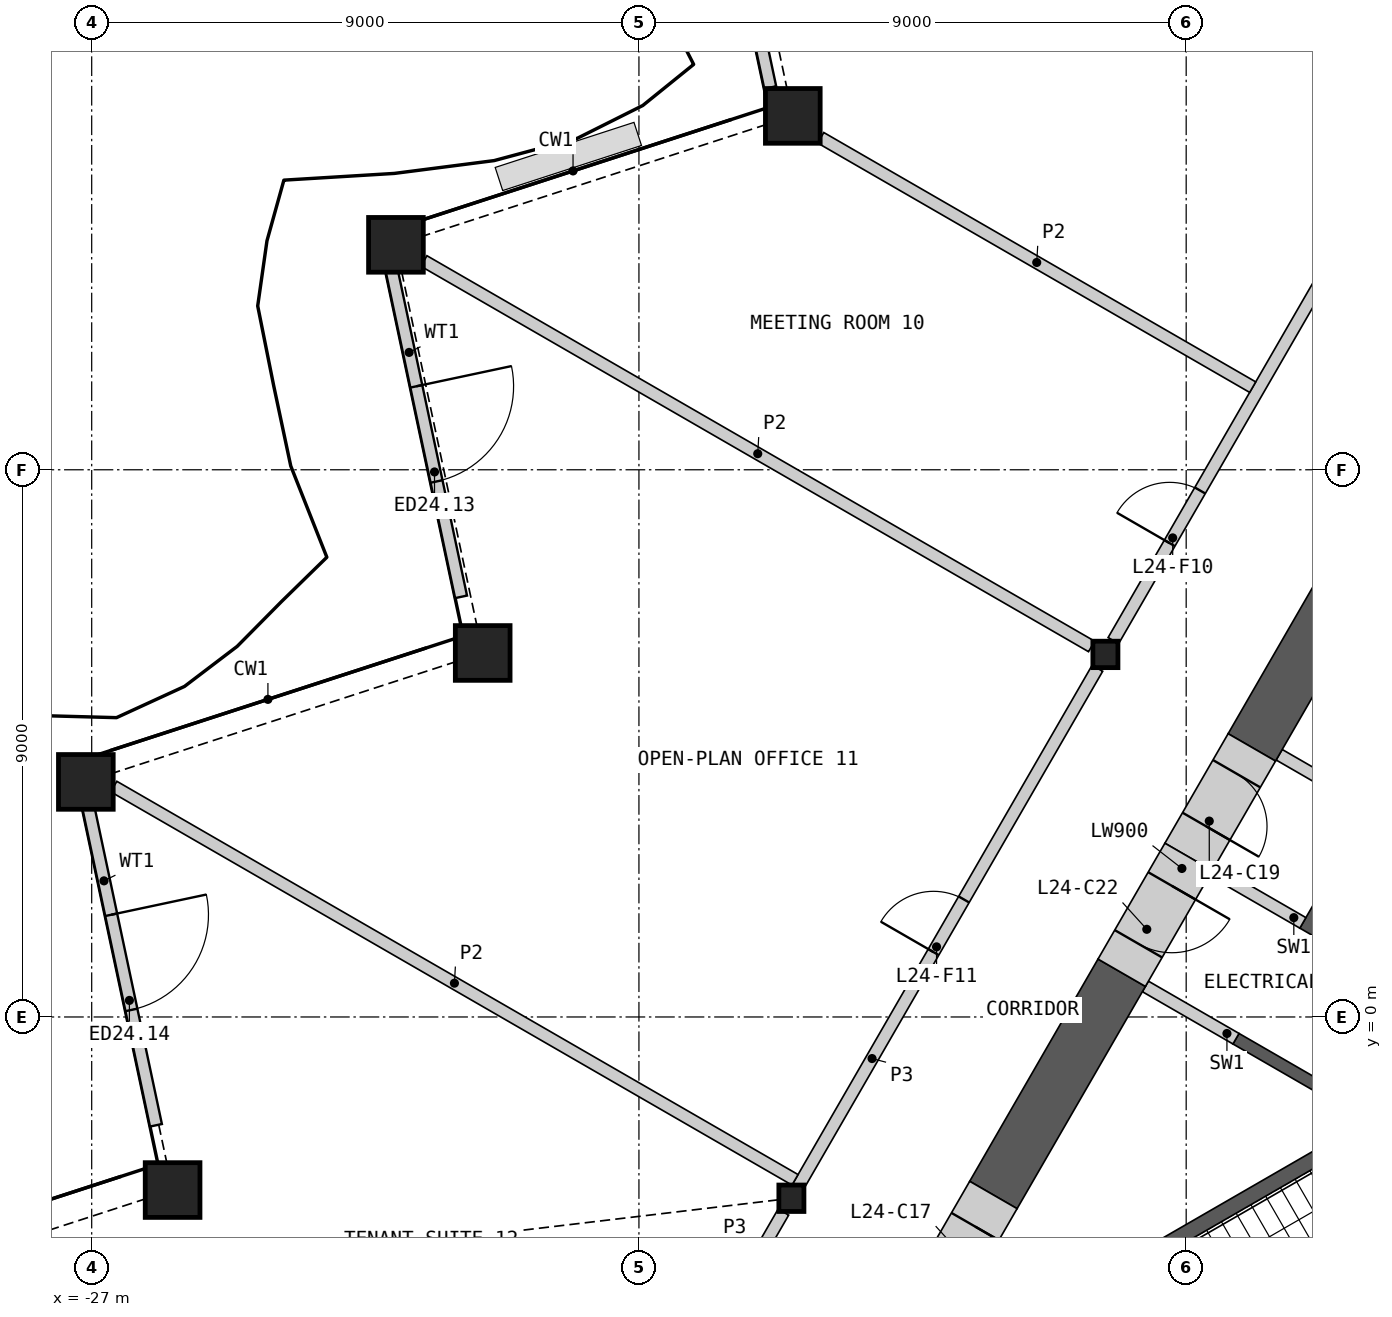
"""IFC4 building model, lengths in metres.
Left out: names, types, materials, properties, quantities, classifications, styles, units other than length and angle.
Written with IfcOpenShell. Run it as: python <this file> out.ifc"""

import sys

from ifc_helpers import new_model, si_unit, direction, frame, frame_2d, origin, origin_2d, place, context, subcontext, project, spatial, polyline, rectangle, hollow_rectangle, i_section, outline, extrude, element, fill, save


model = new_model("IFC4")
c1 = context("Model", 3, precision=1e-05, world=origin(), true_north=direction((0.0, 1.0)))
c2 = subcontext(c1, "Body", "Model", "MODEL_VIEW")
j1 = project(units=[si_unit("LENGTHUNIT", "METRE"), si_unit("PLANEANGLEUNIT", "RADIAN")], contexts=[c1])
p1 = place(None, origin())
s1 = spatial("IfcSite", under=j1, at=p1, CompositionType="ELEMENT")
p2 = place(p1, origin())
s2 = spatial("IfcBuilding", under=s1, at=p2, CompositionType="ELEMENT")
p3 = place(p2, frame((0.0, 0.0, 116.4)))
s3 = spatial("IfcBuildingStorey", under=s2, at=p3, CompositionType="ELEMENT", Elevation=116.4)
for number, where, z_axis, x_axis in (
    (1, (-15.469, 14.82, 0.0), (0.0, 0.0, 1.0), (1.0, 0.0, 0.0)),
    (2, (-21.996, 12.699, 0.0), (0.0, 0.0, 1.0), (1.0, 0.0, 0.0)),
    (3, (-20.57, 5.987, 0.0), (0.0, 0.0, 1.0), (1.0, 0.0, 0.0)),
    (4, (-27.096, 3.866, 0.0), (0.0, 0.0, 1.0), (1.0, 0.0, 0.0)),
    (5, (-25.669, -2.846, 0.0), (0.0, 0.0, 1.0), (1.0, 0.0, 0.0)),
):
    element("IfcColumn", number, at=place(p3, frame(where, z_axis=z_axis, x_axis=x_axis)), inside=s3, PredefinedType="COLUMN", context=c2, shape_type="SweptSolid", body=[
        extrude(hollow_rectangle(XDim=0.9, YDim=0.9, WallThickness=0.06, at=origin_2d()), origin(), (0.0, 0.0, 1.0), 4.2),
    ])
for number, where, z_axis, x_axis in (
    (6, (-10.328, 5.963, 0.0), (0.0, 0.0, 1.0), (1.0, 0.0, 0.0)),
    (7, (-15.493, -2.982, 0.0), (0.0, 0.0, 1.0), (1.0, 0.0, 0.0)),
):
    element("IfcColumn", number, at=place(p3, frame(where, z_axis=z_axis, x_axis=x_axis)), inside=s3, PredefinedType="COLUMN", context=c2, shape_type="SweptSolid", body=[
        extrude(i_section(OverallWidth=0.412, OverallDepth=0.435, WebThickness=0.036, FlangeThickness=0.057, at=origin_2d()), origin(), (0.0, 0.0, 1.0), 4.2),
    ])
p4 = place(p3, frame((-17.069, 21.066, 0.0), z_axis=(0.0, 0.0, 1.0), x_axis=(0.207917562075, -0.978146352741, 0.0)))
e8 = element("IfcWall", 8, at=p4, inside=s3, PredefinedType="SOLIDWALL", context=c2, shape_type="SweptSolid", body=[
    extrude(rectangle(XDim=5.909, YDim=0.2, at=frame_2d((2.954, 0.0))), origin(), (0.0, 0.0, 1.0), 3.189),
])
p5 = place(p4, frame((2.047, 0.0, 0.0)))
e9 = element("IfcOpeningElement", 9, at=p5, cuts=e8, PredefinedType="OPENING", context=c2, shape_type="SweptSolid", body=[
    extrude(rectangle(XDim=1.6, YDim=2.4, at=frame_2d((0.8, 1.2))), frame((0.0, 0.11, 0.0), z_axis=(0.0, -1.0, 0.0), x_axis=(1.0, 0.0, 0.0)), (0.0, 0.0, 1.0), 0.22),
])
p6 = place(p3, frame((-22.065, 12.271, 0.0), z_axis=(0.0, 0.0, 1.0), x_axis=(0.207907239961, -0.978148546782, 0.0)))
e10 = element("IfcWall", 10, at=p6, inside=s3, PredefinedType="SOLIDWALL", context=c2, shape_type="SweptSolid", body=[
    extrude(rectangle(XDim=5.48, YDim=0.2, at=frame_2d((2.74, 0.0))), origin(), (0.0, 0.0, 1.0), 3.189),
])
p7 = place(p6, frame((1.94, 0.0, 0.0)))
e11 = element("IfcOpeningElement", 11, at=p7, cuts=e10, PredefinedType="OPENING", context=c2, shape_type="SweptSolid", body=[
    extrude(rectangle(XDim=1.6, YDim=2.4, at=frame_2d((0.8, 1.2))), frame((0.0, 0.11, 0.0), z_axis=(0.0, -1.0, 0.0), x_axis=(1.0, 0.0, 0.0)), (0.0, 0.0, 1.0), 0.22),
])
p8 = place(p3, frame((-27.083, 3.579, 0.0), z_axis=(0.0, 0.0, 1.0), x_axis=(0.207898180805, -0.978150472278, 0.0)))
e12 = element("IfcWall", 12, at=p8, inside=s3, PredefinedType="SOLIDWALL", context=c2, shape_type="SweptSolid", body=[
    extrude(rectangle(XDim=5.48, YDim=0.2, at=frame_2d((2.74, 0.0))), origin(), (0.0, 0.0, 1.0), 3.189),
])
p9 = place(p8, frame((1.94, 0.0, 0.0)))
e13 = element("IfcOpeningElement", 13, at=p9, cuts=e12, PredefinedType="OPENING", context=c2, shape_type="SweptSolid", body=[
    extrude(rectangle(XDim=1.6, YDim=2.4, at=frame_2d((0.8, 1.2))), frame((0.0, 0.11, 0.0), z_axis=(0.0, -1.0, 0.0), x_axis=(1.0, 0.0, 0.0)), (0.0, 0.0, 1.0), 0.22),
])
p10 = place(p3, origin())
e14 = element("IfcWall", 14, at=p10, inside=s3, PredefinedType="SHEAR", context=c2, shape_type="SweptSolid", body=[
    extrude(outline(polyline([(-6.061, -1.697), (-8.231, -0.444), (-8.131, -0.271), (-5.96, -1.524), (-6.061, -1.697)])), origin(), (0.0, 0.0, 1.0), 3.8),
])
p11 = place(p3, origin())
e15 = element("IfcWall", 15, at=p11, inside=s3, PredefinedType="SHEAR", context=c2, shape_type="SweptSolid", body=[
    extrude(outline(polyline([(-4.96, 0.208), (-7.131, 1.461), (-5.931, 3.54), (-3.76, 2.287), (-3.861, 2.113), (-5.852, 3.263), (-6.852, 1.531), (-4.861, 0.381), (-4.96, 0.208)])), origin(), (0.0, 0.0, 1.0), 3.8),
])
p12 = place(p3, frame((-5.981, 3.453, 0.0), z_axis=(0.0, 0.0, 1.0), x_axis=(-0.866060346521, 0.499939472521, 0.0)))
e16 = element("IfcWall", 16, at=p12, inside=s3, PredefinedType="SHEAR", context=c2, shape_type="SweptSolid", body=[
    extrude(rectangle(XDim=1.72, YDim=0.2, at=frame_2d((0.86, 0.0))), origin(), (0.0, 0.0, 1.0), 3.8),
])
for number, where, z_axis, x_axis in (
    (17, (-7.081, 1.548, 0.0), (0.0, 0.0, 1.0), (-0.866, 0.5, 0.0)),
    (18, (-8.181, -0.357, 0.0), (0.0, 0.0, 1.0), (-0.866, 0.5, 0.0)),
):
    element("IfcWall", number, at=place(p3, frame(where, z_axis=z_axis, x_axis=x_axis)), inside=s3, PredefinedType="SHEAR", context=c2, shape_type="SweptSolid", body=[
        extrude(rectangle(XDim=1.72, YDim=0.2, at=frame_2d((0.86, 0.0))), origin(), (0.0, 0.0, 1.0), 3.8),
    ])
p13 = place(p3, origin())
e19 = element("IfcWall", 19, at=p13, inside=s3, PredefinedType="SHEAR", context=c2, shape_type="SweptSolid", body=[
    extrude(outline(polyline([(-5.307, -1.281), (-10.374, -4.206), (-10.032, -4.298), (-5.182, -1.498), (-5.307, -1.281)])), origin(), (0.0, 0.0, 1.0), 3.8),
])
p14 = place(p3, frame((-3.55, 12.004, 0.0), z_axis=(0.0, 0.0, 1.0), x_axis=(-0.499993245289, -0.866029303583, 0.0)))
e20 = element("IfcWall", 20, at=p14, inside=s3, PredefinedType="SHEAR", context=c2, shape_type="SweptSolid", body=[
    extrude(rectangle(XDim=8.741, YDim=0.9, at=frame_2d((4.37, 0.0))), origin(), (0.0, 0.0, 1.0), 3.8),
])
p15 = place(p3, frame((-10.06, 0.728, 0.0), z_axis=(0.0, 0.0, 1.0), x_axis=(-0.500021220092, -0.866013152012, 0.0)))
e21 = element("IfcWall", 21, at=p15, inside=s3, PredefinedType="SHEAR", context=c2, shape_type="SweptSolid", body=[
    extrude(rectangle(XDim=4.22, YDim=0.9, at=frame_2d((2.11, 0.0))), origin(), (0.0, 0.0, 1.0), 3.8),
])
p16 = place(p3, frame((-12.171, -2.927, 0.0), z_axis=(0.0, 0.0, 1.0), x_axis=(-0.499946605688, -0.86605622881, 0.0)))
e22 = element("IfcWall", 22, at=p16, inside=s3, PredefinedType="SHEAR", context=c2, shape_type="SweptSolid", body=[
    extrude(rectangle(XDim=2.2, YDim=0.9, at=frame_2d((1.1, 0.0))), origin(), (0.0, 0.0, 1.0), 3.8),
])
p17 = place(p16, frame((0.6, 0.0, 0.0)))
e23 = element("IfcOpeningElement", 23, at=p17, cuts=e22, PredefinedType="OPENING", context=c2, shape_type="SweptSolid", body=[
    extrude(rectangle(XDim=1.0, YDim=2.1, at=frame_2d((0.5, 1.05))), frame((0.0, 0.46, 0.0), z_axis=(0.0, -1.0, 0.0), x_axis=(1.0, 0.0, 0.0)), (0.0, 0.0, 1.0), 0.92),
])
p18 = place(p3, frame((-7.92, 4.434, 0.0), z_axis=(0.0, 0.0, 1.0), x_axis=(-0.499939227269, -0.866060488094, 0.0)))
e24 = element("IfcWall", 24, at=p18, inside=s3, PredefinedType="SHEAR", context=c2, shape_type="SweptSolid", body=[
    extrude(rectangle(XDim=2.08, YDim=0.9, at=frame_2d((1.04, 0.0))), origin(), (0.0, 0.0, 1.0), 3.8),
])
p19 = place(p18, frame((0.5, 0.0, 0.0)))
e25 = element("IfcOpeningElement", 25, at=p19, cuts=e24, PredefinedType="OPENING", context=c2, shape_type="SweptSolid", body=[
    extrude(rectangle(XDim=1.0, YDim=2.1, at=frame_2d((0.5, 1.05))), frame((0.0, 0.46, 0.0), z_axis=(0.0, -1.0, 0.0), x_axis=(1.0, 0.0, 0.0)), (0.0, 0.0, 1.0), 0.92),
])
p20 = place(p3, frame((-8.96, 2.633, 0.0), z_axis=(0.0, 0.0, 1.0), x_axis=(-0.50002983664, -0.866008176907, 0.0)))
e26 = element("IfcWall", 26, at=p20, inside=s3, PredefinedType="SHEAR", context=c2, shape_type="SweptSolid", body=[
    extrude(rectangle(XDim=2.2, YDim=0.9, at=frame_2d((1.1, 0.0))), origin(), (0.0, 0.0, 1.0), 3.8),
])
p21 = place(p20, frame((0.55, 0.0, 0.0)))
e27 = element("IfcOpeningElement", 27, at=p21, cuts=e26, PredefinedType="OPENING", context=c2, shape_type="SweptSolid", body=[
    extrude(rectangle(XDim=1.1, YDim=2.1, at=frame_2d((0.55, 1.05))), frame((0.0, 0.46, 0.0), z_axis=(0.0, -1.0, 0.0), x_axis=(1.0, 0.0, 0.0)), (0.0, 0.0, 1.0), 0.92),
])
p22 = place(p3, frame((-10.197, 6.19, 0.0), z_axis=(0.0, 0.0, 1.0), x_axis=(0.500012035596, 0.866018454918, 0.0)))
e28 = element("IfcWall", 28, at=p22, inside=s3, PredefinedType="PARTITIONING", context=c2, shape_type="SweptSolid", body=[
    extrude(rectangle(XDim=9.803, YDim=0.2, at=frame_2d((4.902, 0.0))), origin(), (0.0, 0.0, 1.0), 3.8),
])
p23 = place(p22, frame((1.851, 0.0, 0.0)))
e29 = element("IfcOpeningElement", 29, at=p23, cuts=e28, PredefinedType="OPENING", context=c2, shape_type="SweptSolid", body=[
    extrude(rectangle(XDim=1.0, YDim=2.1, at=frame_2d((0.5, 1.05))), frame((0.0, 0.11, 0.0), z_axis=(0.0, -1.0, 0.0), x_axis=(1.0, 0.0, 0.0)), (0.0, 0.0, 1.0), 0.22),
])
p24 = place(p3, frame((-15.402, -2.823, 0.0), z_axis=(0.0, 0.0, 1.0), x_axis=(0.500023237168, 0.866011987384, 0.0)))
e30 = element("IfcWall", 30, at=p24, inside=s3, PredefinedType="PARTITIONING", context=c2, shape_type="SweptSolid", body=[
    extrude(rectangle(XDim=9.883, YDim=0.2, at=frame_2d((4.942, 0.0))), origin(), (0.0, 0.0, 1.0), 3.8),
])
p25 = place(p24, frame((4.492, 0.0, 0.0)))
e31 = element("IfcOpeningElement", 31, at=p25, cuts=e30, PredefinedType="OPENING", context=c2, shape_type="SweptSolid", body=[
    extrude(rectangle(XDim=1.0, YDim=2.1, at=frame_2d((0.5, 1.05))), frame((0.0, 0.11, 0.0), z_axis=(0.0, -1.0, 0.0), x_axis=(1.0, 0.0, 0.0)), (0.0, 0.0, 1.0), 0.22),
])
p26 = place(p3, frame((-18.744, -8.613, 0.0), z_axis=(0.0, 0.0, 1.0), x_axis=(0.499997920671, 0.866026604282, 0.0)))
e32 = element("IfcWall", 32, at=p26, inside=s3, PredefinedType="PARTITIONING", context=c2, shape_type="SweptSolid", body=[
    extrude(rectangle(XDim=6.24, YDim=0.2, at=frame_2d((3.12, 0.0))), origin(), (0.0, 0.0, 1.0), 3.8),
])
p27 = place(p26, frame((2.67, 0.0, 0.0)))
e33 = element("IfcOpeningElement", 33, at=p27, cuts=e32, PredefinedType="OPENING", context=c2, shape_type="SweptSolid", body=[
    extrude(rectangle(XDim=1.0, YDim=2.1, at=frame_2d((0.5, 1.05))), frame((0.0, 0.11, 0.0), z_axis=(0.0, -1.0, 0.0), x_axis=(1.0, 0.0, 0.0)), (0.0, 0.0, 1.0), 0.22),
])
p28 = place(p3, frame((-26.636, 3.79, 0.0), z_axis=(0.0, 0.0, 1.0), x_axis=(0.866029074283, -0.499993642455, 0.0)))
e34 = element("IfcWall", 34, at=p28, inside=s3, PredefinedType="PARTITIONING", context=c2, shape_type="SweptSolid", body=[
    extrude(rectangle(XDim=12.936, YDim=0.2, at=frame_2d((6.468, 0.0))), origin(), (0.0, 0.0, 1.0), 2.885),
])
p29 = place(p3, frame((-21.536, 12.434, 0.0), z_axis=(0.0, 0.0, 1.0), x_axis=(0.86602461759, -0.500001361726, 0.0)))
e35 = element("IfcWall", 35, at=p29, inside=s3, PredefinedType="PARTITIONING", context=c2, shape_type="SweptSolid", body=[
    extrude(rectangle(XDim=12.679, YDim=0.2, at=frame_2d((6.34, 0.0))), origin(), (0.0, 0.0, 1.0), 2.885),
])
p30 = place(p3, frame((-15.01, 14.46, 0.0), z_axis=(0.0, 0.0, 1.0), x_axis=(0.86602003489, -0.500009299083, 0.0)))
e36 = element("IfcWall", 36, at=p30, inside=s3, PredefinedType="PARTITIONING", context=c2, shape_type="SweptSolid", body=[
    extrude(rectangle(XDim=8.202, YDim=0.2, at=frame_2d((4.101, 0.0))), origin(), (0.0, 0.0, 1.0), 2.885),
])
p31 = place(p7, origin())
e37 = element("IfcDoor", 37, at=p31, inside=s3, OperationType="DOUBLE_DOOR_SINGLE_SWING", PredefinedType="DOOR", context=c2, shape_type="SweptSolid", body=[
    extrude(rectangle(XDim=1.6, YDim=2.4, at=frame_2d((0.8, 1.2))), frame((0.0, 0.025, 0.0), z_axis=(0.0, -1.0, 0.0), x_axis=(1.0, 0.0, 0.0)), (0.0, 0.0, 1.0), 0.05),
])
fill(e11, e37)
p32 = place(p9, origin())
e38 = element("IfcDoor", 38, at=p32, inside=s3, OperationType="DOUBLE_DOOR_SINGLE_SWING", PredefinedType="DOOR", context=c2, shape_type="SweptSolid", body=[
    extrude(rectangle(XDim=1.6, YDim=2.4, at=frame_2d((0.8, 1.2))), frame((0.0, 0.025, 0.0), z_axis=(0.0, -1.0, 0.0), x_axis=(1.0, 0.0, 0.0)), (0.0, 0.0, 1.0), 0.05),
])
fill(e13, e38)
p33 = place(p17, origin())
e39 = element("IfcDoor", 39, at=p33, inside=s3, OperationType="SINGLE_SWING_LEFT", PredefinedType="DOOR", context=c2, shape_type="SweptSolid", body=[
    extrude(rectangle(XDim=1.0, YDim=2.1, at=frame_2d((0.5, 1.05))), frame((0.0, 0.205, 0.0), z_axis=(0.0, -1.0, 0.0), x_axis=(1.0, 0.0, 0.0)), (0.0, 0.0, 1.0), 0.05),
])
fill(e23, e39)
p34 = place(p19, origin())
e40 = element("IfcDoor", 40, at=p34, inside=s3, OperationType="SINGLE_SWING_RIGHT", PredefinedType="DOOR", context=c2, shape_type="SweptSolid", body=[
    extrude(rectangle(XDim=1.0, YDim=2.1, at=frame_2d((0.5, 1.05))), frame((0.0, 0.205, 0.0), z_axis=(0.0, -1.0, 0.0), x_axis=(1.0, 0.0, 0.0)), (0.0, 0.0, 1.0), 0.05),
])
fill(e25, e40)
p35 = place(p21, origin())
e41 = element("IfcDoor", 41, at=p35, inside=s3, OperationType="SINGLE_SWING_LEFT", PredefinedType="DOOR", context=c2, shape_type="SweptSolid", body=[
    extrude(rectangle(XDim=1.1, YDim=2.1, at=frame_2d((0.55, 1.05))), frame((0.0, 0.205, 0.0), z_axis=(0.0, -1.0, 0.0), x_axis=(1.0, 0.0, 0.0)), (0.0, 0.0, 1.0), 0.05),
])
fill(e27, e41)
p36 = place(p23, origin())
e42 = element("IfcDoor", 42, at=p36, inside=s3, OperationType="SINGLE_SWING_LEFT", PredefinedType="DOOR", context=c2, shape_type="SweptSolid", body=[
    extrude(rectangle(XDim=1.0, YDim=2.1, at=frame_2d((0.5, 1.05))), frame((0.0, 0.025, 0.0), z_axis=(0.0, -1.0, 0.0), x_axis=(1.0, 0.0, 0.0)), (0.0, 0.0, 1.0), 0.05),
])
fill(e29, e42)
p37 = place(p25, origin())
e43 = element("IfcDoor", 43, at=p37, inside=s3, OperationType="SINGLE_SWING_LEFT", PredefinedType="DOOR", context=c2, shape_type="SweptSolid", body=[
    extrude(rectangle(XDim=1.0, YDim=2.1, at=frame_2d((0.5, 1.05))), frame((0.0, 0.025, 0.0), z_axis=(0.0, -1.0, 0.0), x_axis=(1.0, 0.0, 0.0)), (0.0, 0.0, 1.0), 0.05),
])
fill(e31, e43)
save(model, sys.argv[1])
